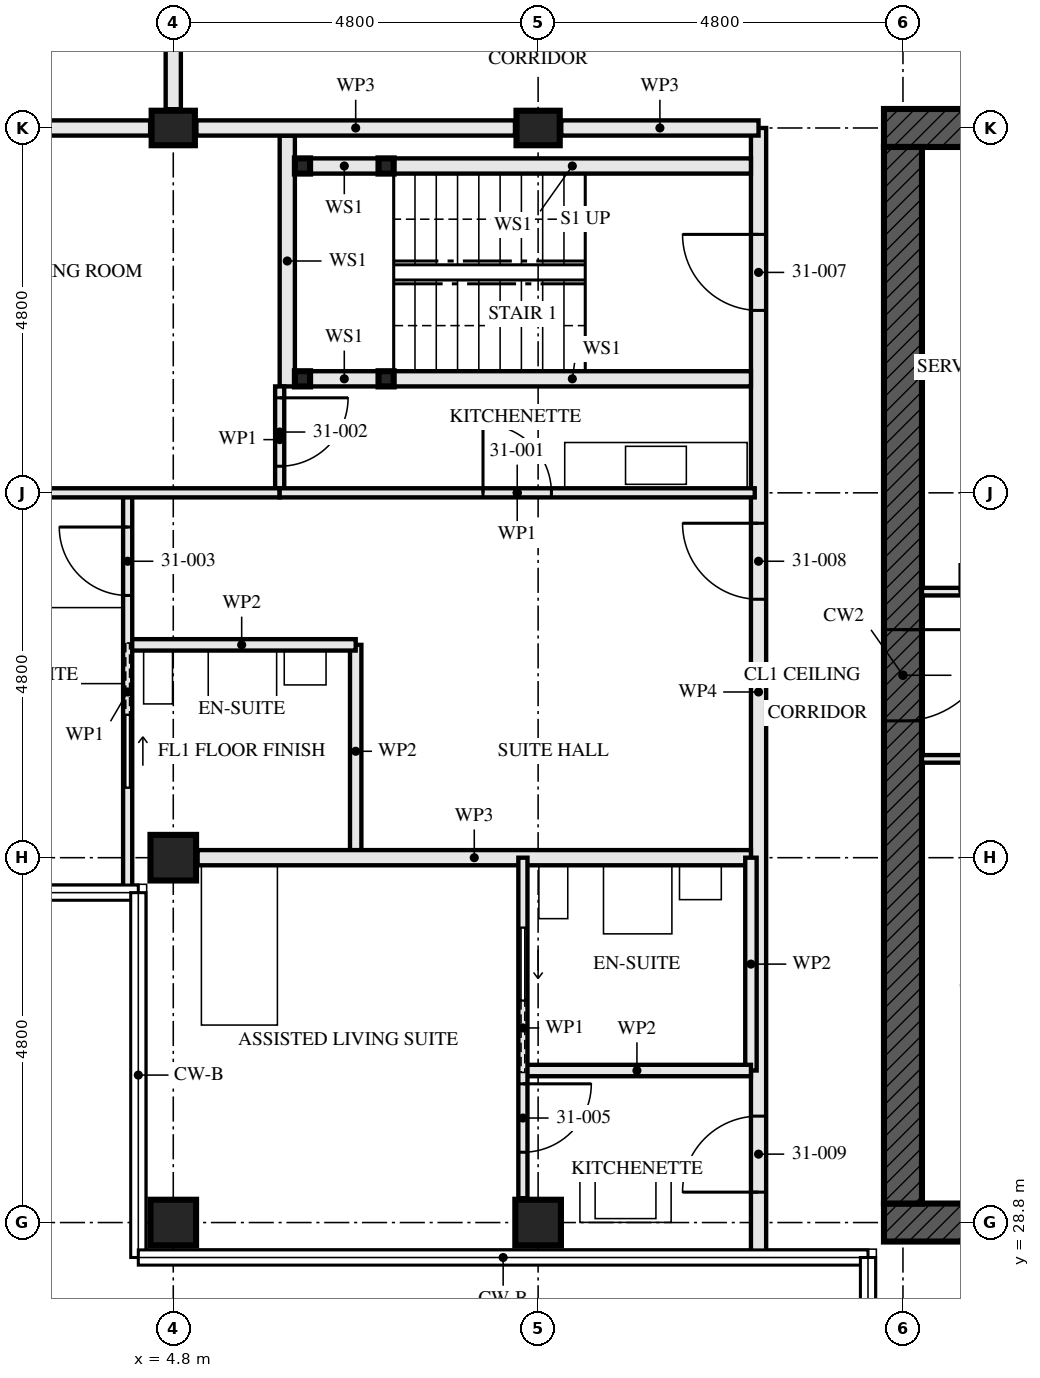
"""IFC4 building model, lengths in metres.
Left out: names, types, materials, properties, quantities, classifications, styles, units other than length and angle.
Written with IfcOpenShell. Run it as: python <this file> out.ifc"""

import sys

from ifc_helpers import new_model, si_unit, direction, frame, frame_2d, origin, origin_2d, place, context, subcontext, project, spatial, rectangle, hollow_rectangle, i_section, extrude, element, fill, save


model = new_model("IFC4")
c1 = context("Model", 3, precision=1e-05, world=origin(), true_north=direction((0.0, 1.0)))
c2 = subcontext(c1, "Body", "Model", "MODEL_VIEW")
j1 = project(units=[si_unit("LENGTHUNIT", "METRE"), si_unit("PLANEANGLEUNIT", "RADIAN")], contexts=[c1])
p1 = place(None, origin())
s1 = spatial("IfcSite", under=j1, at=p1, CompositionType="ELEMENT")
p2 = place(p1, origin())
s2 = spatial("IfcBuilding", under=s1, at=p2, CompositionType="ELEMENT")
p3 = place(p2, frame((0.0, 0.0, 115.5)))
s3 = spatial("IfcBuildingStorey", under=s2, at=p3, CompositionType="ELEMENT", Elevation=115.5)
for number, where, z_axis, x_axis in (
    (1, (4.8, 28.8, 0.0), (0.0, 0.0, 1.0), (0.0, 1.0, 0.0)),
    (2, (4.8, 33.6, 0.0), (0.0, 0.0, 1.0), (0.0, 1.0, 0.0)),
):
    element("IfcColumn", number, at=place(p3, frame(where, z_axis=z_axis, x_axis=x_axis)), inside=s3, PredefinedType="COLUMN", context=c2, shape_type="SweptSolid", body=[
        extrude(hollow_rectangle(XDim=0.6, YDim=0.6, WallThickness=0.08, at=origin_2d()), origin(), (0.0, 0.0, 1.0), 3.5),
    ])
p4 = place(p3, frame((4.8, 43.2, 0.0), z_axis=(0.0, 0.0, 1.0), x_axis=(0.0, 1.0, 0.0)))
e3 = element("IfcColumn", 3, at=p4, inside=s3, PredefinedType="COLUMN", context=c2, shape_type="SweptSolid", body=[
    extrude(i_section(OverallWidth=0.454, OverallDepth=0.569, WebThickness=0.078, FlangeThickness=0.125, FilletRadius=0.015, at=origin_2d()), origin(), (0.0, 0.0, 1.0), 3.5),
])
p5 = place(p3, frame((9.6, 28.8, 0.0), z_axis=(0.0, 0.0, 1.0), x_axis=(0.0, 1.0, 0.0)))
e4 = element("IfcColumn", 4, at=p5, inside=s3, PredefinedType="COLUMN", context=c2, shape_type="SweptSolid", body=[
    extrude(hollow_rectangle(XDim=0.6, YDim=0.6, WallThickness=0.08, at=origin_2d()), origin(), (0.0, 0.0, 1.0), 3.5),
])
p6 = place(p3, frame((9.6, 43.2, 0.0), z_axis=(0.0, 0.0, 1.0), x_axis=(0.0, 1.0, 0.0)))
e5 = element("IfcColumn", 5, at=p6, inside=s3, PredefinedType="COLUMN", context=c2, shape_type="SweptSolid", body=[
    extrude(i_section(OverallWidth=0.454, OverallDepth=0.569, WebThickness=0.078, FlangeThickness=0.125, FilletRadius=0.015, at=origin_2d()), origin(), (0.0, 0.0, 1.0), 3.5),
])
p7 = place(p3, frame((14.15, 28.8, -0.17), z_axis=(0.0, 0.0, 1.0), x_axis=(1.0, 0.0, 0.0)))
e6 = element("IfcWall", 6, at=p7, inside=s3, PredefinedType="SHEAR", context=c2, shape_type="SweptSolid", body=[
    extrude(rectangle(XDim=14.9, YDim=0.5, at=frame_2d((7.45, 0.0))), origin(), (0.0, 0.0, 1.0), 3.5),
])
p8 = place(p7, frame((6.85, 0.0, 0.17)))
e7 = element("IfcOpeningElement", 7, at=p8, cuts=e6, PredefinedType="OPENING", context=c2, shape_type="SweptSolid", body=[
    extrude(rectangle(XDim=1.2, YDim=2.1, at=frame_2d((0.6, 1.05))), frame((0.0, 0.26, 0.0), z_axis=(0.0, -1.0, 0.0), x_axis=(1.0, 0.0, 0.0)), (0.0, 0.0, 1.0), 0.521),
])
p9 = place(p3, frame((29.05, 43.2, -0.17), z_axis=(0.0, 0.0, 1.0), x_axis=(-1.0, 0.0, 0.0)))
e8 = element("IfcWall", 8, at=p9, inside=s3, PredefinedType="SHEAR", context=c2, shape_type="SweptSolid", body=[
    extrude(rectangle(XDim=14.9, YDim=0.5, at=frame_2d((7.45, 0.0))), origin(), (0.0, 0.0, 1.0), 3.5),
])
p10 = place(p9, frame((6.85, 0.0, 0.17)))
e9 = element("IfcOpeningElement", 9, at=p10, cuts=e8, PredefinedType="OPENING", context=c2, shape_type="SweptSolid", body=[
    extrude(rectangle(XDim=1.2, YDim=2.1, at=frame_2d((0.6, 1.05))), frame((0.0, 0.26, 0.0), z_axis=(0.0, -1.0, 0.0), x_axis=(1.0, 0.0, 0.0)), (0.0, 0.0, 1.0), 0.521),
])
p11 = place(p3, frame((14.4, 42.95, -0.17), z_axis=(0.0, 0.0, 1.0), x_axis=(0.0, -1.0, 0.0)))
e10 = element("IfcWall", 10, at=p11, inside=s3, PredefinedType="SHEAR", context=c2, shape_type="SweptSolid", body=[
    extrude(rectangle(XDim=13.9, YDim=0.5, at=frame_2d((6.95, 0.0))), origin(), (0.0, 0.0, 1.0), 3.5),
])
p12 = place(p11, frame((6.35, 0.0, 0.17)))
e11 = element("IfcOpeningElement", 11, at=p12, cuts=e10, PredefinedType="OPENING", context=c2, shape_type="SweptSolid", body=[
    extrude(rectangle(XDim=1.2, YDim=2.1, at=frame_2d((0.6, 1.05))), frame((0.0, 0.26, 0.0), z_axis=(0.0, -1.0, 0.0), x_axis=(1.0, 0.0, 0.0)), (0.0, 0.0, 1.0), 0.521),
])
for number, where, z_axis, x_axis in (
    (12, (6.5, 42.7, 0.0), (0.0, 0.0, 1.0), (1.0, 0.0, 0.0)),
    (13, (6.5, 39.9, 0.0), (0.0, 0.0, 1.0), (1.0, 0.0, 0.0)),
    (14, (7.6, 42.7, 0.0), (0.0, 0.0, 1.0), (1.0, 0.0, 0.0)),
    (15, (7.6, 39.9, 0.0), (0.0, 0.0, 1.0), (1.0, 0.0, 0.0)),
):
    element("IfcColumn", number, at=place(p3, frame(where, z_axis=z_axis, x_axis=x_axis)), inside=s3, PredefinedType="COLUMN", context=c2, shape_type="SweptSolid", body=[
        extrude(hollow_rectangle(XDim=0.2, YDim=0.2, WallThickness=0.008, at=origin_2d()), origin(), (0.0, 0.0, 1.0), 3.33),
    ])
p13 = place(p3, frame((6.6, 42.7, 0.0), z_axis=(0.0, 0.0, 1.0), x_axis=(1.0, 0.0, 0.0)))
e16 = element("IfcWall", 16, at=p13, inside=s3, PredefinedType="SOLIDWALL", context=c2, shape_type="SweptSolid", body=[
    extrude(rectangle(XDim=0.9, YDim=0.2, at=frame_2d((0.45, 0.0))), origin(), (0.0, 0.0, 1.0), 2.99),
])
p14 = place(p3, frame((7.7, 42.7, 0.0), z_axis=(0.0, 0.0, 1.0), x_axis=(1.0, 0.0, 0.0)))
e17 = element("IfcWall", 17, at=p14, inside=s3, PredefinedType="SOLIDWALL", context=c2, shape_type="SweptSolid", body=[
    extrude(rectangle(XDim=4.7, YDim=0.2, at=frame_2d((2.35, 0.0))), origin(), (0.0, 0.0, 1.0), 2.99),
])
p15 = place(p3, frame((6.6, 39.9, 0.0), z_axis=(0.0, 0.0, 1.0), x_axis=(1.0, 0.0, 0.0)))
e18 = element("IfcWall", 18, at=p15, inside=s3, PredefinedType="SOLIDWALL", context=c2, shape_type="SweptSolid", body=[
    extrude(rectangle(XDim=0.9, YDim=0.2, at=frame_2d((0.45, 0.0))), origin(), (0.0, 0.0, 1.0), 2.99),
])
p16 = place(p3, frame((7.7, 39.9, 0.0), z_axis=(0.0, 0.0, 1.0), x_axis=(1.0, 0.0, 0.0)))
e19 = element("IfcWall", 19, at=p16, inside=s3, PredefinedType="SOLIDWALL", context=c2, shape_type="SweptSolid", body=[
    extrude(rectangle(XDim=4.7, YDim=0.2, at=frame_2d((2.35, 0.0))), origin(), (0.0, 0.0, 1.0), 2.99),
])
p17 = place(p3, frame((6.3, 43.1, 0.0), z_axis=(0.0, 0.0, 1.0), x_axis=(0.0, -1.0, 0.0)))
e20 = element("IfcWall", 20, at=p17, inside=s3, PredefinedType="SOLIDWALL", context=c2, shape_type="SweptSolid", body=[
    extrude(rectangle(XDim=3.3, YDim=0.2, at=frame_2d((1.65, 0.0))), origin(), (0.0, 0.0, 1.0), 3.33),
])
p18 = place(p3, frame((4.2, 36.4, 0.0), z_axis=(0.0, 0.0, 1.0), x_axis=(1.0, 0.0, 0.0)))
e21 = element("IfcWall", 21, at=p18, inside=s3, PredefinedType="PARTITIONING", context=c2, shape_type="SweptSolid", body=[
    extrude(rectangle(XDim=3.0, YDim=0.15, at=frame_2d((1.5, 0.0))), origin(), (0.0, 0.0, 1.0), 3.33),
])
p19 = place(p3, frame((7.2, 36.4, 0.0), z_axis=(0.0, 0.0, 1.0), x_axis=(0.0, -1.0, 0.0)))
e22 = element("IfcWall", 22, at=p19, inside=s3, PredefinedType="PARTITIONING", context=c2, shape_type="SweptSolid", body=[
    extrude(rectangle(XDim=2.8, YDim=0.15, at=frame_2d((1.4, 0.0))), origin(), (0.0, 0.0, 1.0), 3.33),
])
p20 = place(p3, frame((6.2, 38.4, 0.0), z_axis=(0.0, 0.0, 1.0), x_axis=(1.0, 0.0, 0.0)))
e23 = element("IfcWall", 23, at=p20, inside=s3, PredefinedType="PARTITIONING", context=c2, shape_type="SweptSolid", body=[
    extrude(rectangle(XDim=6.25, YDim=0.12, at=frame_2d((3.125, 0.0))), origin(), (0.0, 0.0, 1.0), 2.55),
])
p21 = place(p20, frame((2.675, 0.0, 0.0)))
e24 = element("IfcOpeningElement", 24, at=p21, cuts=e23, PredefinedType="OPENING", context=c2, shape_type="SweptSolid", body=[
    extrude(rectangle(XDim=0.9, YDim=2.1, at=frame_2d((0.45, 1.05))), frame((0.0, 0.071, 0.0), z_axis=(0.0, -1.0, 0.0), x_axis=(1.0, 0.0, 0.0)), (0.0, 0.0, 1.0), 0.141),
])
p22 = place(p3, frame((6.2, 39.8, 0.0), z_axis=(0.0, 0.0, 1.0), x_axis=(0.0, -1.0, 0.0)))
e25 = element("IfcWall", 25, at=p22, inside=s3, PredefinedType="PARTITIONING", context=c2, shape_type="SweptSolid", body=[
    extrude(rectangle(XDim=1.4, YDim=0.12, at=frame_2d((0.7, 0.0))), origin(), (0.0, 0.0, 1.0), 3.33),
])
p23 = place(p22, frame((0.15, 0.0, 0.0)))
e26 = element("IfcOpeningElement", 26, at=p23, cuts=e25, PredefinedType="OPENING", context=c2, shape_type="SweptSolid", body=[
    extrude(rectangle(XDim=0.9, YDim=2.1, at=frame_2d((0.45, 1.05))), frame((0.0, 0.071, 0.0), z_axis=(0.0, -1.0, 0.0), x_axis=(1.0, 0.0, 0.0)), (0.0, 0.0, 1.0), 0.141),
])
p24 = place(p3, frame((4.2, 38.4, 0.0), z_axis=(0.0, 0.0, 1.0), x_axis=(0.0, -1.0, 0.0)))
e27 = element("IfcWall", 27, at=p24, inside=s3, PredefinedType="PARTITIONING", context=c2, shape_type="SweptSolid", body=[
    extrude(rectangle(XDim=5.24, YDim=0.12, at=frame_2d((2.62, 0.0))), origin(), (0.0, 0.0, 1.0), 2.32),
])
p25 = place(p24, frame((0.45, 0.0, 0.0)))
e28 = element("IfcOpeningElement", 28, at=p25, cuts=e27, PredefinedType="OPENING", context=c2, shape_type="SweptSolid", body=[
    extrude(rectangle(XDim=0.9, YDim=2.1, at=frame_2d((0.45, 1.05))), frame((0.0, 0.071, 0.0), z_axis=(0.0, -1.0, 0.0), x_axis=(1.0, 0.0, 0.0)), (0.0, 0.0, 1.0), 0.141),
])
p26 = place(p24, frame((2.925, 0.0, 0.0)))
e29 = element("IfcOpeningElement", 29, at=p26, cuts=e27, PredefinedType="OPENING", context=c2, shape_type="SweptSolid", body=[
    extrude(rectangle(XDim=0.95, YDim=2.1, at=frame_2d((0.475, 1.05))), frame((0.0, 0.071, 0.0), z_axis=(0.0, -1.0, 0.0), x_axis=(1.0, 0.0, 0.0)), (0.0, 0.0, 1.0), 0.141),
])
p27 = place(p3, frame((0.32, 38.4, 0.0), z_axis=(0.0, 0.0, 1.0), x_axis=(1.0, 0.0, 0.0)))
e30 = element("IfcWall", 30, at=p27, inside=s3, PredefinedType="PARTITIONING", context=c2, shape_type="SweptSolid", body=[
    extrude(rectangle(XDim=5.88, YDim=0.12, at=frame_2d((2.94, 0.0))), origin(), (0.0, 0.0, 1.0), 2.55),
])
p28 = place(p3, frame((5.12, 33.6, 0.0), z_axis=(0.0, 0.0, 1.0), x_axis=(1.0, 0.0, 0.0)))
e31 = element("IfcWall", 31, at=p28, inside=s3, PredefinedType="PARTITIONING", context=c2, shape_type="SweptSolid", body=[
    extrude(rectangle(XDim=7.28, YDim=0.2, at=frame_2d((3.64, 0.0))), origin(), (0.0, 0.0, 1.0), 2.55),
])
p29 = place(p3, frame((9.4, 30.8, 0.0), z_axis=(0.0, 0.0, 1.0), x_axis=(1.0, 0.0, 0.0)))
e32 = element("IfcWall", 32, at=p29, inside=s3, PredefinedType="PARTITIONING", context=c2, shape_type="SweptSolid", body=[
    extrude(rectangle(XDim=3.0, YDim=0.15, at=frame_2d((1.5, 0.0))), origin(), (0.0, 0.0, 1.0), 3.33),
])
p30 = place(p3, frame((12.4, 33.6, 0.0), z_axis=(0.0, 0.0, 1.0), x_axis=(0.0, -1.0, 0.0)))
e33 = element("IfcWall", 33, at=p30, inside=s3, PredefinedType="PARTITIONING", context=c2, shape_type="SweptSolid", body=[
    extrude(rectangle(XDim=2.8, YDim=0.15, at=frame_2d((1.4, 0.0))), origin(), (0.0, 0.0, 1.0), 3.33),
])
p31 = place(p3, frame((9.4, 33.6, 0.0), z_axis=(0.0, 0.0, 1.0), x_axis=(0.0, -1.0, 0.0)))
e34 = element("IfcWall", 34, at=p31, inside=s3, PredefinedType="PARTITIONING", context=c2, shape_type="SweptSolid", body=[
    extrude(rectangle(XDim=4.48, YDim=0.12, at=frame_2d((2.24, 0.0))), origin(), (0.0, 0.0, 1.0), 3.33),
])
p32 = place(p31, frame((2.975, 0.0, 0.0)))
e35 = element("IfcOpeningElement", 35, at=p32, cuts=e34, PredefinedType="OPENING", context=c2, shape_type="SweptSolid", body=[
    extrude(rectangle(XDim=0.9, YDim=2.1, at=frame_2d((0.45, 1.05))), frame((0.0, 0.071, 0.0), z_axis=(0.0, -1.0, 0.0), x_axis=(1.0, 0.0, 0.0)), (0.0, 0.0, 1.0), 0.141),
])
p33 = place(p31, frame((0.925, 0.0, 0.0)))
e36 = element("IfcOpeningElement", 36, at=p33, cuts=e34, PredefinedType="OPENING", context=c2, shape_type="SweptSolid", body=[
    extrude(rectangle(XDim=0.95, YDim=2.1, at=frame_2d((0.475, 1.05))), frame((0.0, 0.071, 0.0), z_axis=(0.0, -1.0, 0.0), x_axis=(1.0, 0.0, 0.0)), (0.0, 0.0, 1.0), 0.141),
])
p34 = place(p3, frame((12.5, 43.2, 0.0), z_axis=(0.0, 0.0, 1.0), x_axis=(0.0, -1.0, 0.0)))
e37 = element("IfcWall", 37, at=p34, inside=s3, PredefinedType="PARTITIONING", context=c2, shape_type="SweptSolid", body=[
    extrude(rectangle(XDim=14.84, YDim=0.2, at=frame_2d((7.42, 0.0))), origin(), (0.0, 0.0, 1.0), 2.32),
])
p35 = place(p34, frame((1.4, 0.0, 0.0)))
e38 = element("IfcOpeningElement", 38, at=p35, cuts=e37, PredefinedType="OPENING", context=c2, shape_type="SweptSolid", body=[
    extrude(rectangle(XDim=1.0, YDim=2.1, at=frame_2d((0.5, 1.05))), frame((0.0, 0.111, 0.0), z_axis=(0.0, -1.0, 0.0), x_axis=(1.0, 0.0, 0.0)), (0.0, 0.0, 1.0), 0.221),
])
p36 = place(p34, frame((5.2, 0.0, 0.0)))
e39 = element("IfcOpeningElement", 39, at=p36, cuts=e37, PredefinedType="OPENING", context=c2, shape_type="SweptSolid", body=[
    extrude(rectangle(XDim=1.0, YDim=2.1, at=frame_2d((0.5, 1.05))), frame((0.0, 0.111, 0.0), z_axis=(0.0, -1.0, 0.0), x_axis=(1.0, 0.0, 0.0)), (0.0, 0.0, 1.0), 0.221),
])
p37 = place(p34, frame((13.0, 0.0, 0.0)))
e40 = element("IfcOpeningElement", 40, at=p37, cuts=e37, PredefinedType="OPENING", context=c2, shape_type="SweptSolid", body=[
    extrude(rectangle(XDim=1.0, YDim=2.1, at=frame_2d((0.5, 1.05))), frame((0.0, 0.111, 0.0), z_axis=(0.0, -1.0, 0.0), x_axis=(1.0, 0.0, 0.0)), (0.0, 0.0, 1.0), 0.221),
])
p38 = place(p3, frame((4.8, 45.2, 0.0), z_axis=(0.0, 0.0, 1.0), x_axis=(0.0, -1.0, 0.0)))
e41 = element("IfcWall", 41, at=p38, inside=s3, PredefinedType="PARTITIONING", context=c2, shape_type="SweptSolid", body=[
    extrude(rectangle(XDim=1.753, YDim=0.2, at=frame_2d((0.876, 0.0))), origin(), (0.0, 0.0, 1.0), 3.33),
])
p39 = place(p3, frame((14.65, 34.9, 0.0), z_axis=(0.0, 0.0, 1.0), x_axis=(1.0, 0.0, 0.0)))
e42 = element("IfcWall", 42, at=p39, inside=s3, PredefinedType="SOLIDWALL", context=c2, shape_type="SweptSolid", body=[
    extrude(rectangle(XDim=5.9, YDim=0.1, at=frame_2d((2.95, 0.0))), origin(), (0.0, 0.0, 1.0), 3.33),
])
p40 = place(p39, frame((1.6, 0.0, 0.0)))
e43 = element("IfcOpeningElement", 43, at=p40, cuts=e42, PredefinedType="OPENING", context=c2, shape_type="SweptSolid", body=[
    extrude(rectangle(XDim=0.7, YDim=2.1, at=frame_2d((0.35, 1.05))), frame((0.0, 0.061, 0.0), z_axis=(0.0, -1.0, 0.0), x_axis=(1.0, 0.0, 0.0)), (0.0, 0.0, 1.0), 0.121),
])
p41 = place(p3, frame((14.65, 37.1, 0.0), z_axis=(0.0, 0.0, 1.0), x_axis=(1.0, 0.0, 0.0)))
e44 = element("IfcWall", 44, at=p41, inside=s3, PredefinedType="SOLIDWALL", context=c2, shape_type="SweptSolid", body=[
    extrude(rectangle(XDim=5.9, YDim=0.1, at=frame_2d((2.95, 0.0))), origin(), (0.0, 0.0, 1.0), 3.33),
])
p42 = place(p41, frame((0.5, 0.0, 0.0)))
e45 = element("IfcOpeningElement", 45, at=p42, cuts=e44, PredefinedType="OPENING", context=c2, shape_type="SweptSolid", body=[
    extrude(rectangle(XDim=0.7, YDim=2.1, at=frame_2d((0.35, 1.05))), frame((0.0, 0.061, 0.0), z_axis=(0.0, -1.0, 0.0), x_axis=(1.0, 0.0, 0.0)), (0.0, 0.0, 1.0), 0.121),
])
p43 = place(p41, frame((1.9, 0.0, 0.0)))
e46 = element("IfcOpeningElement", 46, at=p43, cuts=e44, PredefinedType="OPENING", context=c2, shape_type="SweptSolid", body=[
    extrude(rectangle(XDim=0.9, YDim=2.1, at=frame_2d((0.45, 1.05))), frame((0.0, 0.061, 0.0), z_axis=(0.0, -1.0, 0.0), x_axis=(1.0, 0.0, 0.0)), (0.0, 0.0, 1.0), 0.121),
])
p44 = place(p3, frame((12.5, 43.2, 0.0), z_axis=(0.0, 0.0, 1.0), x_axis=(-1.0, 0.0, 0.0)))
e47 = element("IfcWall", 47, at=p44, inside=s3, PredefinedType="PARTITIONING", context=c2, shape_type="SweptSolid", body=[
    extrude(rectangle(XDim=2.595, YDim=0.2, at=frame_2d((1.298, 0.0))), origin(), (0.0, 0.0, 1.0), 2.32),
])
p45 = place(p3, frame((9.295, 43.2, 0.0), z_axis=(0.0, 0.0, 1.0), x_axis=(-1.0, 0.0, 0.0)))
e48 = element("IfcWall", 48, at=p45, inside=s3, PredefinedType="PARTITIONING", context=c2, shape_type="SweptSolid", body=[
    extrude(rectangle(XDim=4.191, YDim=0.2, at=frame_2d((2.095, 0.0))), origin(), (0.0, 0.0, 1.0), 2.32),
])
p46 = place(p3, frame((4.496, 43.2, 0.0), z_axis=(0.0, 0.0, 1.0), x_axis=(-1.0, 0.0, 0.0)))
e49 = element("IfcWall", 49, at=p46, inside=s3, PredefinedType="PARTITIONING", context=c2, shape_type="SweptSolid", body=[
    extrude(rectangle(XDim=4.201, YDim=0.2, at=frame_2d((2.1, 0.0))), origin(), (0.0, 0.0, 1.0), 2.32),
])
p47 = place(p21, origin())
e50 = element("IfcDoor", 50, at=p47, inside=s3, OperationType="SINGLE_SWING_RIGHT", PredefinedType="DOOR", context=c2, shape_type="SweptSolid", body=[
    extrude(rectangle(XDim=0.9, YDim=2.1, at=frame_2d((0.45, 1.05))), frame((0.0, 0.022, 0.0), z_axis=(0.0, -1.0, 0.0), x_axis=(1.0, 0.0, 0.0)), (0.0, 0.0, 1.0), 0.044),
])
fill(e24, e50)
p48 = place(p23, origin())
e51 = element("IfcDoor", 51, at=p48, inside=s3, OperationType="SINGLE_SWING_RIGHT", PredefinedType="DOOR", context=c2, shape_type="SweptSolid", body=[
    extrude(rectangle(XDim=0.9, YDim=2.1, at=frame_2d((0.45, 1.05))), frame((0.0, 0.022, 0.0), z_axis=(0.0, -1.0, 0.0), x_axis=(1.0, 0.0, 0.0)), (0.0, 0.0, 1.0), 0.044),
])
fill(e26, e51)
p49 = place(p25, frame((0.9, 0.0, 0.0), z_axis=(0.0, 0.0, 1.0), x_axis=(-1.0, 0.0, 0.0)))
e52 = element("IfcDoor", 52, at=p49, inside=s3, OperationType="SINGLE_SWING_LEFT", PredefinedType="DOOR", context=c2, shape_type="SweptSolid", body=[
    extrude(rectangle(XDim=0.9, YDim=2.1, at=frame_2d((0.45, 1.05))), frame((0.0, 0.022, 0.0), z_axis=(0.0, -1.0, 0.0), x_axis=(1.0, 0.0, 0.0)), (0.0, 0.0, 1.0), 0.044),
])
fill(e28, e52)
p50 = place(p26, origin())
e53 = element("IfcDoor", 53, at=p50, inside=s3, OperationType="SLIDING_TO_RIGHT", PredefinedType="DOOR", context=c2, shape_type="SweptSolid", body=[
    extrude(rectangle(XDim=0.95, YDim=2.1, at=frame_2d((0.475, 1.05))), frame((0.0, 0.022, 0.0), z_axis=(0.0, -1.0, 0.0), x_axis=(1.0, 0.0, 0.0)), (0.0, 0.0, 1.0), 0.044),
])
fill(e29, e53)
p51 = place(p32, origin())
e54 = element("IfcDoor", 54, at=p51, inside=s3, OperationType="SINGLE_SWING_RIGHT", PredefinedType="DOOR", context=c2, shape_type="SweptSolid", body=[
    extrude(rectangle(XDim=0.9, YDim=2.1, at=frame_2d((0.45, 1.05))), frame((0.0, 0.022, 0.0), z_axis=(0.0, -1.0, 0.0), x_axis=(1.0, 0.0, 0.0)), (0.0, 0.0, 1.0), 0.044),
])
fill(e35, e54)
p52 = place(p33, origin())
e55 = element("IfcDoor", 55, at=p52, inside=s3, OperationType="SLIDING_TO_LEFT", PredefinedType="DOOR", context=c2, shape_type="SweptSolid", body=[
    extrude(rectangle(XDim=0.95, YDim=2.1, at=frame_2d((0.475, 1.05))), frame((0.0, 0.022, 0.0), z_axis=(0.0, -1.0, 0.0), x_axis=(1.0, 0.0, 0.0)), (0.0, 0.0, 1.0), 0.044),
])
fill(e36, e55)
p53 = place(p35, frame((1.0, 0.0, 0.0), z_axis=(0.0, 0.0, 1.0), x_axis=(-1.0, 0.0, 0.0)))
e56 = element("IfcDoor", 56, at=p53, inside=s3, OperationType="SINGLE_SWING_LEFT", PredefinedType="DOOR", context=c2, shape_type="SweptSolid", body=[
    extrude(rectangle(XDim=1.0, YDim=2.1, at=frame_2d((0.5, 1.05))), frame((0.0, 0.032, 0.0), z_axis=(0.0, -1.0, 0.0), x_axis=(1.0, 0.0, 0.0)), (0.0, 0.0, 1.0), 0.064),
])
fill(e38, e56)
p54 = place(p36, frame((1.0, 0.0, 0.0), z_axis=(0.0, 0.0, 1.0), x_axis=(-1.0, 0.0, 0.0)))
e57 = element("IfcDoor", 57, at=p54, inside=s3, OperationType="SINGLE_SWING_LEFT", PredefinedType="DOOR", context=c2, shape_type="SweptSolid", body=[
    extrude(rectangle(XDim=1.0, YDim=2.1, at=frame_2d((0.5, 1.05))), frame((0.0, 0.027, 0.0), z_axis=(0.0, -1.0, 0.0), x_axis=(1.0, 0.0, 0.0)), (0.0, 0.0, 1.0), 0.054),
])
fill(e39, e57)
p55 = place(p37, frame((1.0, 0.0, 0.0), z_axis=(0.0, 0.0, 1.0), x_axis=(-1.0, 0.0, 0.0)))
e58 = element("IfcDoor", 58, at=p55, inside=s3, OperationType="SINGLE_SWING_RIGHT", PredefinedType="DOOR", context=c2, shape_type="SweptSolid", body=[
    extrude(rectangle(XDim=1.0, YDim=2.1, at=frame_2d((0.5, 1.05))), frame((0.0, 0.027, 0.0), z_axis=(0.0, -1.0, 0.0), x_axis=(1.0, 0.0, 0.0)), (0.0, 0.0, 1.0), 0.054),
])
fill(e40, e58)
p56 = place(p12, origin())
e59 = element("IfcDoor", 59, at=p56, inside=s3, OperationType="SINGLE_SWING_LEFT", PredefinedType="DOOR", context=c2, shape_type="SweptSolid", body=[
    extrude(rectangle(XDim=1.2, YDim=2.1, at=frame_2d((0.6, 1.05))), frame((0.0, 0.027, 0.0), z_axis=(0.0, -1.0, 0.0), x_axis=(1.0, 0.0, 0.0)), (0.0, 0.0, 1.0), 0.054),
])
fill(e11, e59)
save(model, sys.argv[1])
